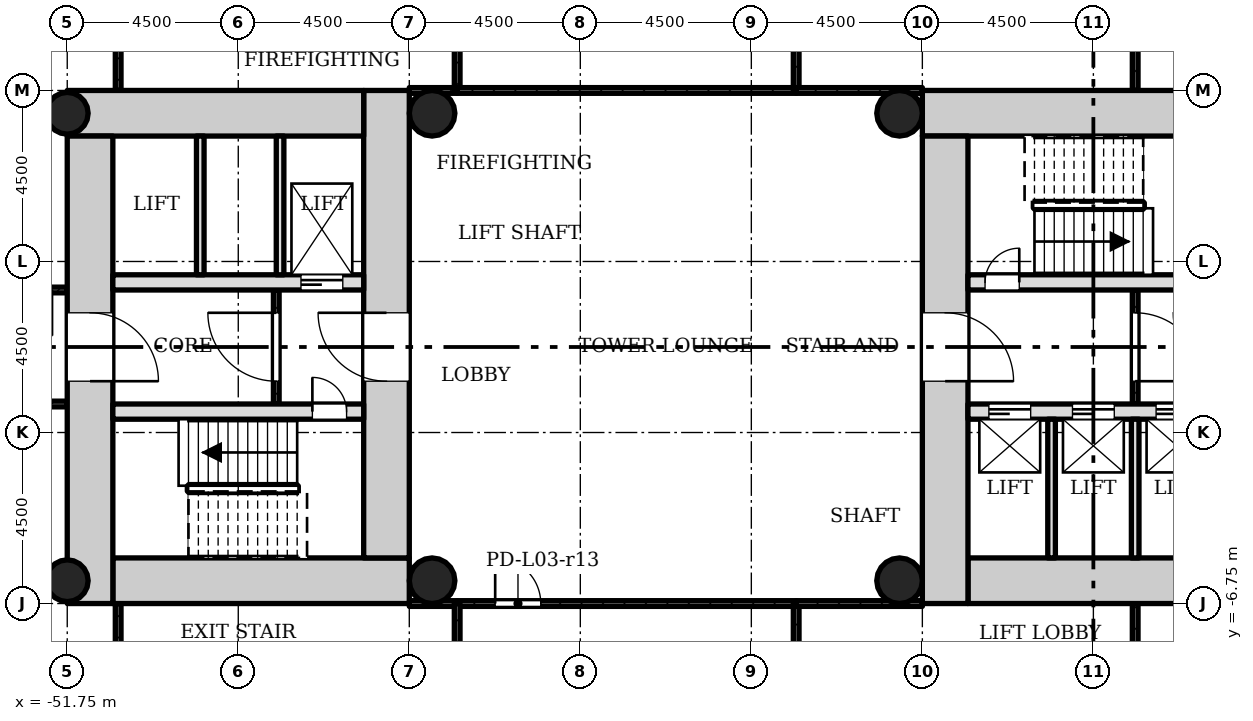
"""IFC4 building model, lengths in metres.
Left out: names, types, materials, properties, quantities, classifications, styles, units other than length and angle.
Written with IfcOpenShell. Run it as: python <this file> out.ifc"""

import sys

from ifc_helpers import new_model, si_unit, direction, frame, frame_2d, origin, origin_2d, place, context, subcontext, project, spatial, rectangle, hollow_circle, extrude, element, fill, save


model = new_model("IFC4")
c1 = context("Model", 3, precision=1e-05, world=origin(), true_north=direction((0.0, 1.0)))
c2 = subcontext(c1, "Body", "Model", "MODEL_VIEW")
j1 = project(units=[si_unit("LENGTHUNIT", "METRE"), si_unit("PLANEANGLEUNIT", "RADIAN")], contexts=[c1])
p1 = place(None, origin())
s1 = spatial("IfcSite", under=j1, at=p1, CompositionType="ELEMENT")
p2 = place(p1, origin())
s2 = spatial("IfcBuilding", under=s1, at=p2, CompositionType="ELEMENT")
p3 = place(p2, frame((0.0, 0.0, 15.5)))
s3 = spatial("IfcBuildingStorey", under=s2, at=p3, CompositionType="ELEMENT", Elevation=15.5)
for number, where, z_axis, x_axis in (
    (1, (-28.05, -6.15, 0.0), (0.0, 0.0, 1.0), (1.0, 0.0, 0.0)),
    (2, (-21.45, 6.15, 0.0), (0.0, 0.0, 1.0), (-1.0, 0.0, 0.0)),
):
    element("IfcWall", number, at=place(p3, frame(where, z_axis=z_axis, x_axis=x_axis)), inside=s3, PredefinedType="SHEAR", context=c2, shape_type="SweptSolid", body=[
        extrude(rectangle(XDim=7.8, YDim=1.2, at=frame_2d((3.9, 0.0))), origin(), (0.0, 0.0, 1.0), 4.5),
    ])
p4 = place(p3, frame((-28.65, 5.55, 0.0), z_axis=(0.0, 0.0, 1.0), x_axis=(0.0, -1.0, 0.0)))
e3 = element("IfcWall", 3, at=p4, inside=s3, PredefinedType="SHEAR", context=c2, shape_type="SweptSolid", body=[
    extrude(rectangle(XDim=12.3, YDim=1.2, at=frame_2d((6.15, 0.0))), origin(), (0.0, 0.0, 1.0), 4.5),
])
p5 = place(p4, frame((4.65, 0.0, 0.0)))
e4 = element("IfcOpeningElement", 4, at=p5, cuts=e3, PredefinedType="OPENING", context=c2, shape_type="SweptSolid", body=[
    extrude(rectangle(XDim=1.8, YDim=2.1, at=frame_2d((0.9, 1.05))), frame((0.0, 0.61, 0.0), z_axis=(0.0, -1.0, 0.0), x_axis=(1.0, 0.0, 0.0)), (0.0, 0.0, 1.0), 1.22),
])
p6 = place(p3, frame((-28.05, -1.7, 0.0), z_axis=(0.0, 0.0, 1.0), x_axis=(1.0, 0.0, 0.0)))
e5 = element("IfcWall", 5, at=p6, inside=s3, PredefinedType="SHEAR", context=c2, shape_type="SweptSolid", body=[
    extrude(rectangle(XDim=6.6, YDim=0.4, at=frame_2d((3.3, 0.0))), origin(), (0.0, 0.0, 1.0), 4.5),
])
p7 = place(p6, frame((0.55, 0.0, 0.0)))
e6 = element("IfcOpeningElement", 6, at=p7, cuts=e5, PredefinedType="OPENING", context=c2, shape_type="SweptSolid", body=[
    extrude(rectangle(XDim=1.1, YDim=2.1, at=frame_2d((0.55, 1.05))), frame((0.0, 0.21, 0.0), z_axis=(0.0, -1.0, 0.0), x_axis=(1.0, 0.0, 0.0)), (0.0, 0.0, 1.0), 0.42),
])
p8 = place(p6, frame((2.75, 0.0, 0.0)))
e7 = element("IfcOpeningElement", 7, at=p8, cuts=e5, PredefinedType="OPENING", context=c2, shape_type="SweptSolid", body=[
    extrude(rectangle(XDim=1.1, YDim=2.1, at=frame_2d((0.55, 1.05))), frame((0.0, 0.21, 0.0), z_axis=(0.0, -1.0, 0.0), x_axis=(1.0, 0.0, 0.0)), (0.0, 0.0, 1.0), 0.42),
])
p9 = place(p6, frame((4.95, 0.0, 0.0)))
e8 = element("IfcOpeningElement", 8, at=p9, cuts=e5, PredefinedType="OPENING", context=c2, shape_type="SweptSolid", body=[
    extrude(rectangle(XDim=1.1, YDim=2.1, at=frame_2d((0.55, 1.05))), frame((0.0, 0.21, 0.0), z_axis=(0.0, -1.0, 0.0), x_axis=(1.0, 0.0, 0.0)), (0.0, 0.0, 1.0), 0.42),
])
p10 = place(p3, frame((-28.05, 1.7, 0.0), z_axis=(0.0, 0.0, 1.0), x_axis=(1.0, 0.0, 0.0)))
e9 = element("IfcWall", 9, at=p10, inside=s3, PredefinedType="SHEAR", context=c2, shape_type="SweptSolid", body=[
    extrude(rectangle(XDim=6.6, YDim=0.4, at=frame_2d((3.3, 0.0))), origin(), (0.0, 0.0, 1.0), 4.5),
])
p11 = place(p10, frame((0.45, 0.0, 0.0)))
e10 = element("IfcOpeningElement", 10, at=p11, cuts=e9, PredefinedType="OPENING", context=c2, shape_type="SweptSolid", body=[
    extrude(rectangle(XDim=0.9, YDim=2.1, at=frame_2d((0.45, 1.05))), frame((0.0, 0.21, 0.0), z_axis=(0.0, -1.0, 0.0), x_axis=(1.0, 0.0, 0.0)), (0.0, 0.0, 1.0), 0.42),
])
p12 = place(p3, frame((-50.55, -6.15, 0.0), z_axis=(0.0, 0.0, 1.0), x_axis=(1.0, 0.0, 0.0)))
e11 = element("IfcWall", 11, at=p12, inside=s3, PredefinedType="SHEAR", context=c2, shape_type="SweptSolid", body=[
    extrude(rectangle(XDim=7.8, YDim=1.2, at=frame_2d((3.9, 0.0))), origin(), (0.0, 0.0, 1.0), 4.5),
])
p13 = place(p3, frame((-43.35, -5.55, 0.0), z_axis=(0.0, 0.0, 1.0), x_axis=(0.0, 1.0, 0.0)))
e12 = element("IfcWall", 12, at=p13, inside=s3, PredefinedType="SHEAR", context=c2, shape_type="SweptSolid", body=[
    extrude(rectangle(XDim=12.3, YDim=1.2, at=frame_2d((6.15, 0.0))), origin(), (0.0, 0.0, 1.0), 4.5),
])
p14 = place(p13, frame((4.65, 0.0, 0.0)))
e13 = element("IfcOpeningElement", 13, at=p14, cuts=e12, PredefinedType="OPENING", context=c2, shape_type="SweptSolid", body=[
    extrude(rectangle(XDim=1.8, YDim=2.1, at=frame_2d((0.9, 1.05))), frame((0.0, 0.61, 0.0), z_axis=(0.0, -1.0, 0.0), x_axis=(1.0, 0.0, 0.0)), (0.0, 0.0, 1.0), 1.22),
])
p15 = place(p3, frame((-43.95, 6.15, 0.0), z_axis=(0.0, 0.0, 1.0), x_axis=(-1.0, 0.0, 0.0)))
e14 = element("IfcWall", 14, at=p15, inside=s3, PredefinedType="SHEAR", context=c2, shape_type="SweptSolid", body=[
    extrude(rectangle(XDim=7.8, YDim=1.2, at=frame_2d((3.9, 0.0))), origin(), (0.0, 0.0, 1.0), 4.5),
])
p16 = place(p3, frame((-51.15, 5.55, 0.0), z_axis=(0.0, 0.0, 1.0), x_axis=(0.0, -1.0, 0.0)))
e15 = element("IfcWall", 15, at=p16, inside=s3, PredefinedType="SHEAR", context=c2, shape_type="SweptSolid", body=[
    extrude(rectangle(XDim=12.3, YDim=1.2, at=frame_2d((6.15, 0.0))), origin(), (0.0, 0.0, 1.0), 4.5),
])
p17 = place(p16, frame((4.65, 0.0, 0.0)))
e16 = element("IfcOpeningElement", 16, at=p17, cuts=e15, PredefinedType="OPENING", context=c2, shape_type="SweptSolid", body=[
    extrude(rectangle(XDim=1.8, YDim=2.1, at=frame_2d((0.9, 1.05))), frame((0.0, 0.61, 0.0), z_axis=(0.0, -1.0, 0.0), x_axis=(1.0, 0.0, 0.0)), (0.0, 0.0, 1.0), 1.22),
])
p18 = place(p3, frame((-50.55, -1.7, 0.0), z_axis=(0.0, 0.0, 1.0), x_axis=(1.0, 0.0, 0.0)))
e17 = element("IfcWall", 17, at=p18, inside=s3, PredefinedType="SHEAR", context=c2, shape_type="SweptSolid", body=[
    extrude(rectangle(XDim=6.6, YDim=0.4, at=frame_2d((3.3, 0.0))), origin(), (0.0, 0.0, 1.0), 4.5),
])
p19 = place(p18, frame((5.25, 0.0, 0.0)))
e18 = element("IfcOpeningElement", 18, at=p19, cuts=e17, PredefinedType="OPENING", context=c2, shape_type="SweptSolid", body=[
    extrude(rectangle(XDim=0.9, YDim=2.1, at=frame_2d((0.45, 1.05))), frame((0.0, 0.21, 0.0), z_axis=(0.0, -1.0, 0.0), x_axis=(1.0, 0.0, 0.0)), (0.0, 0.0, 1.0), 0.42),
])
p20 = place(p3, frame((-50.55, 1.7, 0.0), z_axis=(0.0, 0.0, 1.0), x_axis=(1.0, 0.0, 0.0)))
e19 = element("IfcWall", 19, at=p20, inside=s3, PredefinedType="SHEAR", context=c2, shape_type="SweptSolid", body=[
    extrude(rectangle(XDim=6.6, YDim=0.4, at=frame_2d((3.3, 0.0))), origin(), (0.0, 0.0, 1.0), 4.5),
])
p21 = place(p20, frame((4.95, 0.0, 0.0)))
e20 = element("IfcOpeningElement", 20, at=p21, cuts=e19, PredefinedType="OPENING", context=c2, shape_type="SweptSolid", body=[
    extrude(rectangle(XDim=1.1, YDim=2.1, at=frame_2d((0.55, 1.05))), frame((0.0, 0.21, 0.0), z_axis=(0.0, -1.0, 0.0), x_axis=(1.0, 0.0, 0.0)), (0.0, 0.0, 1.0), 0.42),
])
for number, where, z_axis, x_axis in (
    (21, (-51.75, -6.15, 0.0), (0.0, 0.0, 1.0), (1.0, 0.0, 0.0)),
    (22, (-51.75, 6.15, 0.0), (0.0, 0.0, 1.0), (1.0, 0.0, 0.0)),
):
    element("IfcColumn", number, at=place(p3, frame(where, z_axis=z_axis, x_axis=x_axis)), inside=s3, PredefinedType="COLUMN", context=c2, shape_type="SweptSolid", body=[
        extrude(hollow_circle(Radius=0.55, WallThickness=0.04, at=origin_2d()), origin(), (0.0, 0.0, 1.0), 4.5),
    ])
for number, where, z_axis, x_axis in (
    (23, (-42.15, -6.15, 0.0), (0.0, 0.0, 1.0), (1.0, 0.0, 0.0)),
    (24, (-29.85, -6.15, 0.0), (0.0, 0.0, 1.0), (1.0, 0.0, 0.0)),
    (25, (-29.85, 6.15, 0.0), (0.0, 0.0, 1.0), (1.0, 0.0, 0.0)),
    (26, (-42.15, 6.15, 0.0), (0.0, 0.0, 1.0), (1.0, 0.0, 0.0)),
):
    element("IfcColumn", number, at=place(p3, frame(where, z_axis=z_axis, x_axis=x_axis)), inside=s3, PredefinedType="COLUMN", context=c2, shape_type="SweptSolid", body=[
        extrude(hollow_circle(Radius=0.6, WallThickness=0.045, at=origin_2d()), origin(), (0.0, 0.0, 1.0), 4.5),
    ])
p22 = place(p3, frame((-23.65, -1.5, 0.0), z_axis=(0.0, 0.0, 1.0), x_axis=(0.0, 1.0, 0.0)))
e27 = element("IfcWall", 27, at=p22, inside=s3, PredefinedType="PARTITIONING", context=c2, shape_type="SweptSolid", body=[
    extrude(rectangle(XDim=3.0, YDim=0.15, at=frame_2d((1.5, 0.0))), origin(), (0.0, 0.0, 1.0), 4.08),
])
p23 = place(p22, frame((0.6, 0.0, 0.0)))
e28 = element("IfcOpeningElement", 28, at=p23, cuts=e27, PredefinedType="OPENING", context=c2, shape_type="SweptSolid", body=[
    extrude(rectangle(XDim=1.8, YDim=2.1, at=frame_2d((0.9, 1.05))), frame((0.0, 0.085, 0.0), z_axis=(0.0, -1.0, 0.0), x_axis=(1.0, 0.0, 0.0)), (0.0, 0.0, 1.0), 0.17),
])
for number, where, z_axis, x_axis in (
    (29, (-25.85, -5.55, 0.0), (0.0, 0.0, 1.0), (0.0, 1.0, 0.0)),
    (30, (-23.65, -5.55, 0.0), (0.0, 0.0, 1.0), (0.0, 1.0, 0.0)),
):
    element("IfcWall", number, at=place(p3, frame(where, z_axis=z_axis, x_axis=x_axis)), inside=s3, PredefinedType="SOLIDWALL", context=c2, shape_type="SweptSolid", body=[
        extrude(rectangle(XDim=3.65, YDim=0.2, at=frame_2d((1.825, 0.0))), origin(), (0.0, 0.0, 1.0), 4.08),
    ])
p24 = place(p3, frame((-46.25, 1.5, 0.0), z_axis=(0.0, 0.0, 1.0), x_axis=(0.0, -1.0, 0.0)))
e31 = element("IfcWall", 31, at=p24, inside=s3, PredefinedType="PARTITIONING", context=c2, shape_type="SweptSolid", body=[
    extrude(rectangle(XDim=3.0, YDim=0.15, at=frame_2d((1.5, 0.0))), origin(), (0.0, 0.0, 1.0), 4.08),
])
p25 = place(p24, frame((0.6, 0.0, 0.0)))
e32 = element("IfcOpeningElement", 32, at=p25, cuts=e31, PredefinedType="OPENING", context=c2, shape_type="SweptSolid", body=[
    extrude(rectangle(XDim=1.8, YDim=2.1, at=frame_2d((0.9, 1.05))), frame((0.0, 0.085, 0.0), z_axis=(0.0, -1.0, 0.0), x_axis=(1.0, 0.0, 0.0)), (0.0, 0.0, 1.0), 0.17),
])
for number, where, z_axis, x_axis in (
    (33, (-46.15, 5.55, 0.0), (0.0, 0.0, 1.0), (0.0, -1.0, 0.0)),
    (34, (-48.25, 5.55, 0.0), (0.0, 0.0, 1.0), (0.0, -1.0, 0.0)),
):
    element("IfcWall", number, at=place(p3, frame(where, z_axis=z_axis, x_axis=x_axis)), inside=s3, PredefinedType="SOLIDWALL", context=c2, shape_type="SweptSolid", body=[
        extrude(rectangle(XDim=3.65, YDim=0.2, at=frame_2d((1.825, 0.0))), origin(), (0.0, 0.0, 1.0), 4.08),
    ])
p26 = place(p3, frame((-59.33, -1.5, 0.0), z_axis=(0.0, 0.0, 1.0), x_axis=(1.0, 0.0, 0.0)))
e35 = element("IfcWall", 35, at=p26, inside=s3, PredefinedType="PARTITIONING", context=c2, shape_type="SweptSolid", body=[
    extrude(rectangle(XDim=7.58, YDim=0.15, at=frame_2d((3.79, 0.0))), origin(), (0.0, 0.0, 1.0), 4.08),
])
p27 = place(p26, frame((0.4, 0.0, 0.0)))
e36 = element("IfcOpeningElement", 36, at=p27, cuts=e35, PredefinedType="OPENING", context=c2, shape_type="SweptSolid", body=[
    extrude(rectangle(XDim=1.2, YDim=2.1, at=frame_2d((0.6, 1.05))), frame((0.0, 0.085, 0.0), z_axis=(0.0, -1.0, 0.0), x_axis=(1.0, 0.0, 0.0)), (0.0, 0.0, 1.0), 0.17),
])
p28 = place(p3, frame((-50.41, -6.75, 0.0), z_axis=(0.0, 0.0, 1.0), x_axis=(0.0, -1.0, 0.0)))
e37 = element("IfcWall", 37, at=p28, inside=s3, PredefinedType="PARTITIONING", context=c2, shape_type="SweptSolid", body=[
    extrude(rectangle(XDim=16.75, YDim=0.15, at=frame_2d((8.375, 0.0))), origin(), (0.0, 0.0, 1.0), 4.08),
])
p29 = place(p3, frame((-51.75, 1.5, 0.0), z_axis=(0.0, 0.0, 1.0), x_axis=(-1.0, 0.0, 0.0)))
e38 = element("IfcWall", 38, at=p29, inside=s3, PredefinedType="PARTITIONING", context=c2, shape_type="SweptSolid", body=[
    extrude(rectangle(XDim=3.58, YDim=0.15, at=frame_2d((1.79, 0.0))), origin(), (0.0, 0.0, 1.0), 4.08),
])
p30 = place(p29, frame((0.4, 0.0, 0.0)))
e39 = element("IfcOpeningElement", 39, at=p30, cuts=e38, PredefinedType="OPENING", context=c2, shape_type="SweptSolid", body=[
    extrude(rectangle(XDim=1.2, YDim=2.1, at=frame_2d((0.6, 1.05))), frame((0.0, 0.085, 0.0), z_axis=(0.0, -1.0, 0.0), x_axis=(1.0, 0.0, 0.0)), (0.0, 0.0, 1.0), 0.17),
])
for number, where, z_axis, x_axis in (
    (40, (-42.75, -6.75, 0.0), (0.0, 0.0, 1.0), (1.0, 0.0, 0.0)),
    (41, (-41.49, 6.75, 0.0), (0.0, 0.0, 1.0), (-1.0, 0.0, 0.0)),
):
    element("IfcWall", number, at=place(p3, frame(where, z_axis=z_axis, x_axis=x_axis)), inside=s3, PredefinedType="PARTITIONING", context=c2, shape_type="SweptSolid", body=[
        extrude(rectangle(XDim=1.26, YDim=0.15, at=frame_2d((0.63, 0.0))), origin(), (0.0, 0.0, 1.0), 4.08),
    ])
for number, where, z_axis, x_axis in (
    (42, (-50.41, 6.75, 0.0), (0.0, 0.0, 1.0), (0.0, 1.0, 0.0)),
    (43, (-41.49, 26.5, 0.0), (0.0, 0.0, 1.0), (0.0, -1.0, 0.0)),
):
    element("IfcWall", number, at=place(p3, frame(where, z_axis=z_axis, x_axis=x_axis)), inside=s3, PredefinedType="PARTITIONING", context=c2, shape_type="SweptSolid", body=[
        extrude(rectangle(XDim=19.75, YDim=0.15, at=frame_2d((9.875, 0.0))), origin(), (0.0, 0.0, 1.0), 4.08),
    ])
p31 = place(p3, frame((-41.49, -6.75, 0.0), z_axis=(0.0, 0.0, 1.0), x_axis=(1.0, 0.0, 0.0)))
e44 = element("IfcWall", 44, at=p31, inside=s3, PredefinedType="PARTITIONING", context=c2, shape_type="SweptSolid", body=[
    extrude(rectangle(XDim=8.92, YDim=0.15, at=frame_2d((4.46, 0.0))), origin(), (0.0, 0.0, 1.0), 4.08),
])
p32 = place(p31, frame((1.0, 0.0, 0.0)))
e45 = element("IfcOpeningElement", 45, at=p32, cuts=e44, PredefinedType="OPENING", context=c2, shape_type="SweptSolid", body=[
    extrude(rectangle(XDim=1.2, YDim=2.1, at=frame_2d((0.6, 1.05))), frame((0.0, 0.085, 0.0), z_axis=(0.0, -1.0, 0.0), x_axis=(1.0, 0.0, 0.0)), (0.0, 0.0, 1.0), 0.17),
])
for number, where, z_axis, x_axis in (
    (46, (-41.49, -23.5, 0.0), (0.0, 0.0, 1.0), (0.0, 1.0, 0.0)),
    (47, (-32.57, -6.75, 0.0), (0.0, 0.0, 1.0), (0.0, -1.0, 0.0)),
):
    element("IfcWall", number, at=place(p3, frame(where, z_axis=z_axis, x_axis=x_axis)), inside=s3, PredefinedType="PARTITIONING", context=c2, shape_type="SweptSolid", body=[
        extrude(rectangle(XDim=16.75, YDim=0.15, at=frame_2d((8.375, 0.0))), origin(), (0.0, 0.0, 1.0), 4.08),
    ])
p33 = place(p3, frame((-32.57, 6.75, 0.0), z_axis=(0.0, 0.0, 1.0), x_axis=(-1.0, 0.0, 0.0)))
e48 = element("IfcWall", 48, at=p33, inside=s3, PredefinedType="PARTITIONING", context=c2, shape_type="SweptSolid", body=[
    extrude(rectangle(XDim=8.92, YDim=0.15, at=frame_2d((4.46, 0.0))), origin(), (0.0, 0.0, 1.0), 4.08),
])
p34 = place(p3, frame((-32.57, 26.5, 0.0), z_axis=(0.0, 0.0, 1.0), x_axis=(0.0, -1.0, 0.0)))
e49 = element("IfcWall", 49, at=p34, inside=s3, PredefinedType="PARTITIONING", context=c2, shape_type="SweptSolid", body=[
    extrude(rectangle(XDim=19.75, YDim=0.15, at=frame_2d((9.875, 0.0))), origin(), (0.0, 0.0, 1.0), 4.08),
])
p35 = place(p3, frame((-32.57, -6.75, 0.0), z_axis=(0.0, 0.0, 1.0), x_axis=(1.0, 0.0, 0.0)))
e50 = element("IfcWall", 50, at=p35, inside=s3, PredefinedType="PARTITIONING", context=c2, shape_type="SweptSolid", body=[
    extrude(rectangle(XDim=3.32, YDim=0.15, at=frame_2d((1.66, 0.0))), origin(), (0.0, 0.0, 1.0), 4.08),
])
p36 = place(p3, frame((-23.65, -6.75, 0.0), z_axis=(0.0, 0.0, 1.0), x_axis=(0.0, -1.0, 0.0)))
e51 = element("IfcWall", 51, at=p36, inside=s3, PredefinedType="PARTITIONING", context=c2, shape_type="SweptSolid", body=[
    extrude(rectangle(XDim=16.75, YDim=0.15, at=frame_2d((8.375, 0.0))), origin(), (0.0, 0.0, 1.0), 4.08),
])
p37 = place(p3, frame((-29.25, 6.75, 0.0), z_axis=(0.0, 0.0, 1.0), x_axis=(-1.0, 0.0, 0.0)))
e52 = element("IfcWall", 52, at=p37, inside=s3, PredefinedType="PARTITIONING", context=c2, shape_type="SweptSolid", body=[
    extrude(rectangle(XDim=3.32, YDim=0.15, at=frame_2d((1.66, 0.0))), origin(), (0.0, 0.0, 1.0), 4.08),
])
p38 = place(p3, frame((-23.65, 26.5, 0.0), z_axis=(0.0, 0.0, 1.0), x_axis=(0.0, -1.0, 0.0)))
e53 = element("IfcWall", 53, at=p38, inside=s3, PredefinedType="PARTITIONING", context=c2, shape_type="SweptSolid", body=[
    extrude(rectangle(XDim=19.75, YDim=0.15, at=frame_2d((9.875, 0.0))), origin(), (0.0, 0.0, 1.0), 4.08),
])
p39 = place(p23, origin())
e54 = element("IfcDoor", 54, at=p39, inside=s3, OperationType="SINGLE_SWING_LEFT", PredefinedType="DOOR", context=c2, shape_type="SweptSolid", body=[
    extrude(rectangle(XDim=1.8, YDim=2.1, at=frame_2d((0.9, 1.05))), frame((0.0, 0.025, 0.0), z_axis=(0.0, -1.0, 0.0), x_axis=(1.0, 0.0, 0.0)), (0.0, 0.0, 1.0), 0.05),
])
fill(e28, e54)
p40 = place(p25, origin())
e55 = element("IfcDoor", 55, at=p40, inside=s3, OperationType="SINGLE_SWING_LEFT", PredefinedType="DOOR", context=c2, shape_type="SweptSolid", body=[
    extrude(rectangle(XDim=1.8, YDim=2.1, at=frame_2d((0.9, 1.05))), frame((0.0, 0.025, 0.0), z_axis=(0.0, -1.0, 0.0), x_axis=(1.0, 0.0, 0.0)), (0.0, 0.0, 1.0), 0.05),
])
fill(e32, e55)
p41 = place(p32, origin())
e56 = element("IfcDoor", 56, at=p41, inside=s3, OperationType="SINGLE_SWING_RIGHT", PredefinedType="DOOR", context=c2, shape_type="SweptSolid", body=[
    extrude(rectangle(XDim=1.2, YDim=2.1, at=frame_2d((0.6, 1.05))), frame((0.0, 0.025, 0.0), z_axis=(0.0, -1.0, 0.0), x_axis=(1.0, 0.0, 0.0)), (0.0, 0.0, 1.0), 0.05),
])
fill(e45, e56)
p42 = place(p11, origin())
e57 = element("IfcDoor", 57, at=p42, inside=s3, OperationType="SINGLE_SWING_LEFT", PredefinedType="DOOR", context=c2, shape_type="SweptSolid", body=[
    extrude(rectangle(XDim=0.9, YDim=2.1, at=frame_2d((0.45, 1.05))), frame((0.0, 0.025, 0.0), z_axis=(0.0, -1.0, 0.0), x_axis=(1.0, 0.0, 0.0)), (0.0, 0.0, 1.0), 0.05),
])
fill(e10, e57)
p43 = place(p7, origin())
e58 = element("IfcDoor", 58, at=p43, inside=s3, OperationType="SLIDING_TO_LEFT", PredefinedType="DOOR", context=c2, shape_type="SweptSolid", body=[
    extrude(rectangle(XDim=1.1, YDim=2.1, at=frame_2d((0.55, 1.05))), frame((0.0, 0.025, 0.0), z_axis=(0.0, -1.0, 0.0), x_axis=(1.0, 0.0, 0.0)), (0.0, 0.0, 1.0), 0.05),
])
fill(e6, e58)
p44 = place(p8, origin())
e59 = element("IfcDoor", 59, at=p44, inside=s3, OperationType="SLIDING_TO_LEFT", PredefinedType="DOOR", context=c2, shape_type="SweptSolid", body=[
    extrude(rectangle(XDim=1.1, YDim=2.1, at=frame_2d((0.55, 1.05))), frame((0.0, 0.025, 0.0), z_axis=(0.0, -1.0, 0.0), x_axis=(1.0, 0.0, 0.0)), (0.0, 0.0, 1.0), 0.05),
])
fill(e7, e59)
p45 = place(p9, origin())
e60 = element("IfcDoor", 60, at=p45, inside=s3, OperationType="SLIDING_TO_LEFT", PredefinedType="DOOR", context=c2, shape_type="SweptSolid", body=[
    extrude(rectangle(XDim=1.1, YDim=2.1, at=frame_2d((0.55, 1.05))), frame((0.0, 0.025, 0.0), z_axis=(0.0, -1.0, 0.0), x_axis=(1.0, 0.0, 0.0)), (0.0, 0.0, 1.0), 0.05),
])
fill(e8, e60)
p46 = place(p5, origin())
e61 = element("IfcDoor", 61, at=p46, inside=s3, OperationType="SINGLE_SWING_LEFT", PredefinedType="DOOR", context=c2, shape_type="SweptSolid", body=[
    extrude(rectangle(XDim=1.8, YDim=2.1, at=frame_2d((0.9, 1.05))), frame((0.0, 0.025, 0.0), z_axis=(0.0, -1.0, 0.0), x_axis=(1.0, 0.0, 0.0)), (0.0, 0.0, 1.0), 0.05),
])
fill(e4, e61)
p47 = place(p19, origin())
e62 = element("IfcDoor", 62, at=p47, inside=s3, OperationType="SINGLE_SWING_RIGHT", PredefinedType="DOOR", context=c2, shape_type="SweptSolid", body=[
    extrude(rectangle(XDim=0.9, YDim=2.1, at=frame_2d((0.45, 1.05))), frame((0.0, 0.025, 0.0), z_axis=(0.0, -1.0, 0.0), x_axis=(1.0, 0.0, 0.0)), (0.0, 0.0, 1.0), 0.05),
])
fill(e18, e62)
p48 = place(p21, origin())
e63 = element("IfcDoor", 63, at=p48, inside=s3, OperationType="SLIDING_TO_LEFT", PredefinedType="DOOR", context=c2, shape_type="SweptSolid", body=[
    extrude(rectangle(XDim=1.1, YDim=2.1, at=frame_2d((0.55, 1.05))), frame((0.0, 0.025, 0.0), z_axis=(0.0, -1.0, 0.0), x_axis=(1.0, 0.0, 0.0)), (0.0, 0.0, 1.0), 0.05),
])
fill(e20, e63)
p49 = place(p14, origin())
e64 = element("IfcDoor", 64, at=p49, inside=s3, OperationType="SINGLE_SWING_LEFT", PredefinedType="DOOR", context=c2, shape_type="SweptSolid", body=[
    extrude(rectangle(XDim=1.8, YDim=2.1, at=frame_2d((0.9, 1.05))), frame((0.0, 0.025, 0.0), z_axis=(0.0, -1.0, 0.0), x_axis=(1.0, 0.0, 0.0)), (0.0, 0.0, 1.0), 0.05),
])
fill(e13, e64)
p50 = place(p17, origin())
e65 = element("IfcDoor", 65, at=p50, inside=s3, OperationType="SINGLE_SWING_LEFT", PredefinedType="DOOR", context=c2, shape_type="SweptSolid", body=[
    extrude(rectangle(XDim=1.8, YDim=2.1, at=frame_2d((0.9, 1.05))), frame((0.0, 0.025, 0.0), z_axis=(0.0, -1.0, 0.0), x_axis=(1.0, 0.0, 0.0)), (0.0, 0.0, 1.0), 0.05),
])
fill(e16, e65)
save(model, sys.argv[1])
